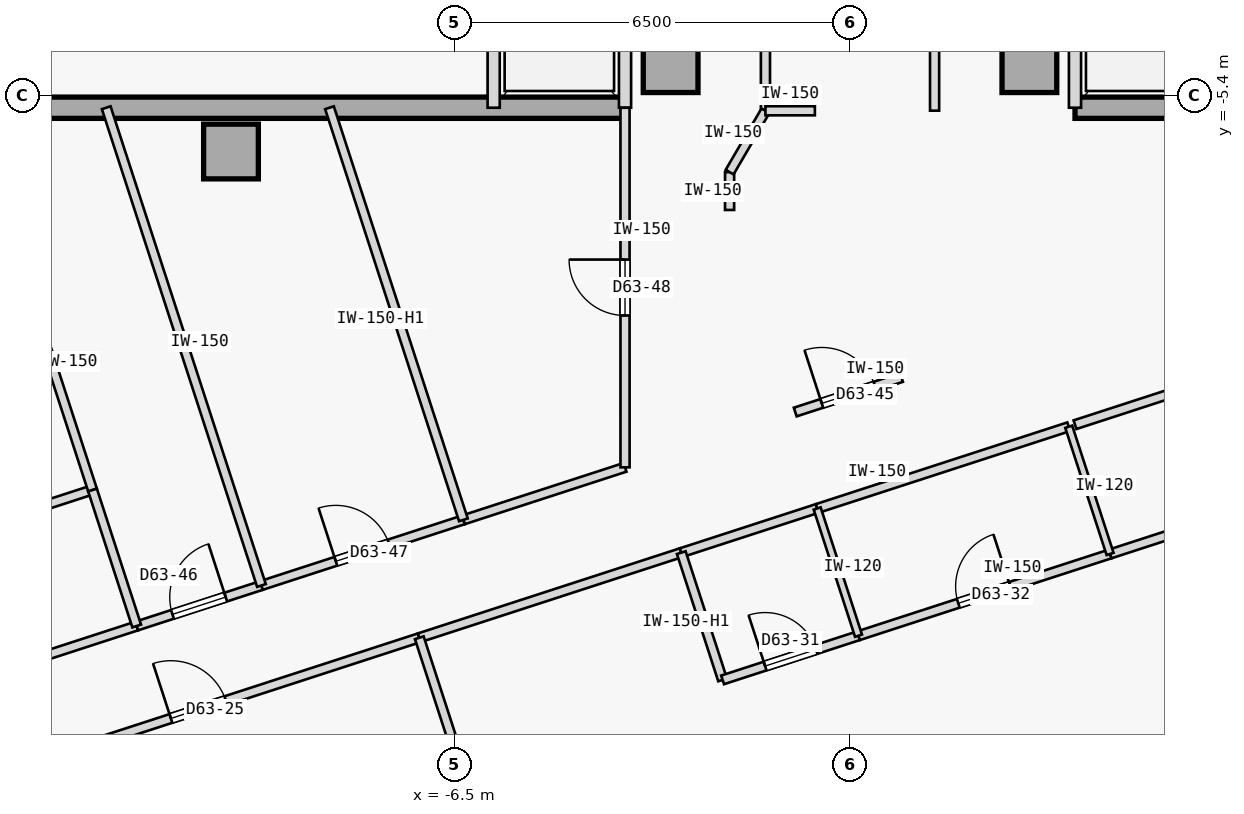
"""IFC4 building model, lengths in metres.
Left out: names, types, materials, properties, quantities, classifications, styles, units other than length and angle.
Written with IfcOpenShell. Run it as: python <this file> out.ifc"""

import sys

from ifc_helpers import new_model, si_unit, direction, frame, frame_2d, origin, origin_2d, place, context, subcontext, project, spatial, rectangle, extrude, element, fill, save


model = new_model("IFC4")
c1 = context("Model", 3, precision=1e-05, world=origin(), true_north=direction((0.0, 1.0)))
c2 = subcontext(c1, "Body", "Model", "MODEL_VIEW")
j1 = project(units=[si_unit("LENGTHUNIT", "METRE"), si_unit("PLANEANGLEUNIT", "RADIAN")], contexts=[c1])
p1 = place(None, origin())
s1 = spatial("IfcSite", under=j1, at=p1, CompositionType="ELEMENT")
p2 = place(p1, origin())
s2 = spatial("IfcBuilding", under=s1, at=p2, CompositionType="ELEMENT")
p3 = place(p2, frame((0.0, 0.0, 237.7)))
s3 = spatial("IfcBuildingStorey", under=s2, at=p3, CompositionType="ELEMENT", Elevation=237.7)
for number, where, z_axis, x_axis in (
    (1, (-10.18, -6.32, 0.0), (0.0, 0.0, 1.0), (1.0, 0.0, 0.0)),
    (2, (-2.95, -4.9, 0.0), (0.0, 0.0, 1.0), (1.0, 0.0, 0.0)),
    (3, (2.95, -4.9, 0.0), (0.0, 0.0, 1.0), (1.0, 0.0, 0.0)),
):
    element("IfcColumn", number, at=place(p3, frame(where, z_axis=z_axis, x_axis=x_axis)), inside=s3, PredefinedType="COLUMN", context=c2, shape_type="SweptSolid", body=[
        extrude(rectangle(XDim=0.9, YDim=0.9, at=origin_2d()), origin(), (0.0, 0.0, 1.0), 3.35),
    ])
for number, where, z_axis, x_axis in (
    (4, (-14.56, -5.6, 0.0), (0.0, 0.0, 1.0), (1.0, 0.0, 0.0)),
    (5, (3.7, -5.6, 0.0), (0.0, 0.0, 1.0), (1.0, 0.0, 0.0)),
):
    element("IfcWall", number, at=place(p3, frame(where, z_axis=z_axis, x_axis=x_axis)), inside=s3, PredefinedType="SHEAR", context=c2, shape_type="SweptSolid", body=[
        extrude(rectangle(XDim=10.86, YDim=0.35, at=frame_2d((5.43, 0.0))), origin(), (0.0, 0.0, 1.0), 3.125),
    ])
for number, where, z_axis, x_axis in (
    (6, (-3.7, -5.6, 0.0), (0.0, 0.0, 1.0), (0.0, 1.0, 0.0)),
    (7, (-5.86, -5.6, 0.0), (0.0, 0.0, 1.0), (0.0, 1.0, 0.0)),
    (8, (3.7, -5.6, 0.0), (0.0, 0.0, 1.0), (0.0, 1.0, 0.0)),
):
    element("IfcWall", number, at=place(p3, frame(where, z_axis=z_axis, x_axis=x_axis)), inside=s3, PredefinedType="STANDARD", context=c2, shape_type="SweptSolid", body=[
        extrude(rectangle(XDim=2.65, YDim=0.2, at=frame_2d((1.325, 0.0))), origin(), (0.0, 0.0, 1.0), 3.125),
    ])
p4 = place(p3, frame((-1.391, -5.65, 0.0), z_axis=(0.0, 0.0, 1.0), x_axis=(-8.6422954e-05, 0.999999996266, 0.0)))
e9 = element("IfcWall", 9, at=p4, inside=s3, PredefinedType="PARTITIONING", context=c2, shape_type="SweptSolid", body=[
    extrude(rectangle(XDim=11.3, YDim=0.15, at=frame_2d((5.65, 0.0))), origin(), (0.0, 0.0, 1.0), 3.125),
])
p5 = place(p4, frame((5.175, 0.0, 0.0)))
e10 = element("IfcOpeningElement", 10, at=p5, cuts=e9, PredefinedType="OPENING", context=c2, shape_type="SweptSolid", body=[
    extrude(rectangle(XDim=0.95, YDim=2.15, at=frame_2d((0.475, 1.075))), frame((0.0, 0.085, 0.0), z_axis=(0.0, -1.0, 0.0), x_axis=(1.0, 0.0, 0.0)), (0.0, 0.0, 1.0), 0.17),
])
p6 = place(p3, frame((1.391, -5.648, 0.0), z_axis=(0.0, 0.0, 1.0), x_axis=(-4.3218947e-05, 0.999999999066, 0.0)))
e11 = element("IfcWall", 11, at=p6, inside=s3, PredefinedType="PARTITIONING", context=c2, shape_type="SweptSolid", body=[
    extrude(rectangle(XDim=11.298, YDim=0.15, at=frame_2d((5.649, 0.0))), origin(), (0.0, 0.0, 1.0), 3.125),
])
p7 = place(p3, frame((-14.349, -16.677, 0.0), z_axis=(0.0, 0.0, 1.0), x_axis=(0.951058958043, 0.309009479345, 0.0)))
e12 = element("IfcWall", 12, at=p7, inside=s3, PredefinedType="PARTITIONING", context=c2, shape_type="SweptSolid", body=[
    extrude(rectangle(XDim=7.64, YDim=0.15, at=frame_2d((3.82, 0.0))), origin(), (0.0, 0.0, 1.0), 3.125),
])
p8 = place(p7, frame((3.345, 0.0, 0.0)))
e13 = element("IfcOpeningElement", 13, at=p8, cuts=e12, PredefinedType="OPENING", context=c2, shape_type="SweptSolid", body=[
    extrude(rectangle(XDim=0.95, YDim=2.15, at=frame_2d((0.475, 1.075))), frame((0.0, 0.085, 0.0), z_axis=(0.0, -1.0, 0.0), x_axis=(1.0, 0.0, 0.0)), (0.0, 0.0, 1.0), 0.17),
])
p9 = place(p3, frame((-7.083, -14.316, 0.0), z_axis=(0.0, 0.0, 1.0), x_axis=(0.951054265246, 0.309023922305, 0.0)))
e14 = element("IfcWall", 14, at=p9, inside=s3, PredefinedType="PARTITIONING", context=c2, shape_type="SweptSolid", body=[
    extrude(rectangle(XDim=4.53, YDim=0.15, at=frame_2d((2.265, 0.0))), origin(), (0.0, 0.0, 1.0), 3.125),
])
p10 = place(p3, frame((-2.775, -12.917, 0.0), z_axis=(0.0, 0.0, 1.0), x_axis=(0.951066131077, 0.308987401554, 0.0)))
e15 = element("IfcWall", 15, at=p10, inside=s3, PredefinedType="PARTITIONING", context=c2, shape_type="SweptSolid", body=[
    extrude(rectangle(XDim=2.35, YDim=0.15, at=frame_2d((1.175, 0.0))), origin(), (0.0, 0.0, 1.0), 3.125),
])
p11 = place(p3, frame((-0.54, -12.19, 0.0), z_axis=(0.0, 0.0, 1.0), x_axis=(0.951057987102, 0.309012467661, 0.0)))
e16 = element("IfcWall", 16, at=p11, inside=s3, PredefinedType="PARTITIONING", context=c2, shape_type="SweptSolid", body=[
    extrude(rectangle(XDim=4.35, YDim=0.15, at=frame_2d((2.175, 0.0))), origin(), (0.0, 0.0, 1.0), 3.125),
])
p12 = place(p3, frame((3.7, -10.813, 0.0), z_axis=(0.0, 0.0, 1.0), x_axis=(0.95106685659, 0.308985168408, 0.0)))
e17 = element("IfcWall", 17, at=p12, inside=s3, PredefinedType="PARTITIONING", context=c2, shape_type="SweptSolid", body=[
    extrude(rectangle(XDim=3.392, YDim=0.15, at=frame_2d((1.696, 0.0))), origin(), (0.0, 0.0, 1.0), 3.125),
])
p13 = place(p3, frame((-29.45, -19.881, 0.0), z_axis=(0.0, 0.0, 1.0), x_axis=(0.95105650271, 0.309017036186, 0.0)))
e18 = element("IfcWall", 18, at=p13, inside=s3, PredefinedType="PARTITIONING", context=c2, shape_type="SweptSolid", body=[
    extrude(rectangle(XDim=18.632, YDim=0.15, at=frame_2d((9.316, 0.0))), origin(), (0.0, 0.0, 1.0), 3.125),
])
p14 = place(p13, frame((8.856, 0.0, 0.0)))
e19 = element("IfcOpeningElement", 19, at=p14, cuts=e18, PredefinedType="OPENING", context=c2, shape_type="SweptSolid", body=[
    extrude(rectangle(XDim=0.92, YDim=2.15, at=frame_2d((0.46, 1.075))), frame((0.0, 0.085, 0.0), z_axis=(0.0, -1.0, 0.0), x_axis=(1.0, 0.0, 0.0)), (0.0, 0.0, 1.0), 0.17),
])
p15 = place(p3, frame((-0.901, -10.604, 0.0), z_axis=(0.0, 0.0, 1.0), x_axis=(0.951085784807, 0.308926900637, 0.0)))
e20 = element("IfcWall", 20, at=p15, inside=s3, PredefinedType="PARTITIONING", context=c2, shape_type="SweptSolid", body=[
    extrude(rectangle(XDim=1.838, YDim=0.15, at=frame_2d((0.919, 0.0))), origin(), (0.0, 0.0, 1.0), 3.125),
])
p16 = place(p15, frame((0.459, 0.0, 0.0)))
e21 = element("IfcOpeningElement", 21, at=p16, cuts=e20, PredefinedType="OPENING", context=c2, shape_type="SweptSolid", body=[
    extrude(rectangle(XDim=0.92, YDim=2.15, at=frame_2d((0.46, 1.075))), frame((0.0, 0.085, 0.0), z_axis=(0.0, -1.0, 0.0), x_axis=(1.0, 0.0, 0.0)), (0.0, 0.0, 1.0), 0.17),
])
p17 = place(p3, frame((-1.98, -7.281, 0.0), z_axis=(0.0, 0.0, 1.0), x_axis=(0.000784313484, 0.999999692426, 0.0)))
e22 = element("IfcWall", 22, at=p17, inside=s3, PredefinedType="PARTITIONING", context=c2, shape_type="SweptSolid", body=[
    extrude(rectangle(XDim=0.623, YDim=0.15, at=frame_2d((0.311, 0.0))), origin(), (0.0, 0.0, 1.0), 3.125),
])
p18 = place(p3, frame((-1.98, -6.659, 0.0), z_axis=(0.0, 0.0, 1.0), x_axis=(0.504533622976, 0.863392044952, 0.0)))
e23 = element("IfcWall", 23, at=p18, inside=s3, PredefinedType="PARTITIONING", context=c2, shape_type="SweptSolid", body=[
    extrude(rectangle(XDim=1.168, YDim=0.15, at=frame_2d((0.584, 0.0))), origin(), (0.0, 0.0, 1.0), 3.125),
])
p19 = place(p3, frame((-11.73, -14.123, 0.0), z_axis=(0.0, 0.0, 1.0), x_axis=(0.951066501686, 0.308986260812, 0.0)))
e24 = element("IfcWall", 24, at=p19, inside=s3, PredefinedType="PARTITIONING", context=c2, shape_type="SweptSolid", body=[
    extrude(rectangle(XDim=2.157, YDim=0.15, at=frame_2d((1.079, 0.0))), origin(), (0.0, 0.0, 1.0), 3.125),
])
p20 = place(p19, frame((0.618, 0.0, 0.0)))
e25 = element("IfcOpeningElement", 25, at=p20, cuts=e24, PredefinedType="OPENING", context=c2, shape_type="SweptSolid", body=[
    extrude(rectangle(XDim=0.92, YDim=2.15, at=frame_2d((0.46, 1.075))), frame((0.0, 0.085, 0.0), z_axis=(0.0, -1.0, 0.0), x_axis=(1.0, 0.0, 0.0)), (0.0, 0.0, 1.0), 0.17),
])
p21 = place(p3, frame((-9.679, -13.457, 0.0), z_axis=(0.0, 0.0, 1.0), x_axis=(0.951054104561, 0.309024416831, 0.0)))
e26 = element("IfcWall", 26, at=p21, inside=s3, PredefinedType="PARTITIONING", context=c2, shape_type="SweptSolid", body=[
    extrude(rectangle(XDim=3.492, YDim=0.15, at=frame_2d((1.746, 0.0))), origin(), (0.0, 0.0, 1.0), 3.125),
])
p22 = place(p21, frame((1.286, 0.0, 0.0)))
e27 = element("IfcOpeningElement", 27, at=p22, cuts=e26, PredefinedType="OPENING", context=c2, shape_type="SweptSolid", body=[
    extrude(rectangle(XDim=0.92, YDim=2.15, at=frame_2d((0.46, 1.075))), frame((0.0, 0.085, 0.0), z_axis=(0.0, -1.0, 0.0), x_axis=(1.0, 0.0, 0.0)), (0.0, 0.0, 1.0), 0.17),
])
p23 = place(p3, frame((-6.358, -12.377, 0.0), z_axis=(0.0, 0.0, 1.0), x_axis=(0.951049473261, 0.309038669765, 0.0)))
e28 = element("IfcWall", 28, at=p23, inside=s3, PredefinedType="PARTITIONING", context=c2, shape_type="SweptSolid", body=[
    extrude(rectangle(XDim=2.795, YDim=0.15, at=frame_2d((1.397, 0.0))), origin(), (0.0, 0.0, 1.0), 3.125),
])
p24 = place(p3, frame((-3.7, -11.514, 0.0), z_axis=(0.0, 0.0, 1.0), x_axis=(-8.2572974e-05, 0.999999996591, 0.0)))
e29 = element("IfcWall", 29, at=p24, inside=s3, PredefinedType="PARTITIONING", context=c2, shape_type="SweptSolid", body=[
    extrude(rectangle(XDim=5.913, YDim=0.15, at=frame_2d((2.957, 0.0))), origin(), (0.0, 0.0, 1.0), 3.125),
])
p25 = place(p24, frame((2.497, 0.0, 0.0)))
e30 = element("IfcOpeningElement", 30, at=p25, cuts=e29, PredefinedType="OPENING", context=c2, shape_type="SweptSolid", body=[
    extrude(rectangle(XDim=0.92, YDim=2.15, at=frame_2d((0.46, 1.075))), frame((0.0, 0.085, 0.0), z_axis=(0.0, -1.0, 0.0), x_axis=(1.0, 0.0, 0.0)), (0.0, 0.0, 1.0), 0.17),
])
p26 = place(p3, frame((-1.391, -5.65, 0.0), z_axis=(0.0, 0.0, 1.0), x_axis=(0.999999954883, 0.000300390494, 0.0)))
e31 = element("IfcWall", 31, at=p26, inside=s3, PredefinedType="PARTITIONING", context=c2, shape_type="SweptSolid", body=[
    extrude(rectangle(XDim=0.813, YDim=0.15, at=frame_2d((0.406, 0.0))), origin(), (0.0, 0.0, 1.0), 3.125),
])
p27 = place(p3, frame((-4.036, -23.696, 0.0), z_axis=(0.0, 0.0, 1.0), x_axis=(-0.309022258842, 0.95105480575, 0.0)))
e32 = element("IfcWall", 32, at=p27, inside=s3, PredefinedType="PARTITIONING", context=c2, shape_type="SweptSolid", body=[
    extrude(rectangle(XDim=9.862, YDim=0.15, at=frame_2d((4.931, 0.0))), origin(), (0.0, 0.0, 1.0), 2.675),
])
p28 = place(p3, frame((-2.095, -15.009, 0.0), z_axis=(0.0, 0.0, 1.0), x_axis=(-0.308960600764, 0.951074837842, 0.0)))
e33 = element("IfcWall", 33, at=p28, inside=s3, PredefinedType="PARTITIONING", context=c2, shape_type="SweptSolid", body=[
    extrude(rectangle(XDim=2.2, YDim=0.15, at=frame_2d((1.1, 0.0))), origin(), (0.0, 0.0, 1.0), 2.675),
])
p29 = place(p3, frame((-2.095, -15.009, 0.0), z_axis=(0.0, 0.0, 1.0), x_axis=(0.951076048914, 0.308956872689, 0.0)))
e34 = element("IfcWall", 34, at=p29, inside=s3, PredefinedType="PARTITIONING", context=c2, shape_type="SweptSolid", body=[
    extrude(rectangle(XDim=2.35, YDim=0.15, at=frame_2d((1.175, 0.0))), origin(), (0.0, 0.0, 1.0), 3.125),
])
p30 = place(p29, frame((0.735, 0.0, 0.0)))
e35 = element("IfcOpeningElement", 35, at=p30, cuts=e34, PredefinedType="OPENING", context=c2, shape_type="SweptSolid", body=[
    extrude(rectangle(XDim=0.88, YDim=2.15, at=frame_2d((0.44, 1.075))), frame((0.0, 0.085, 0.0), z_axis=(0.0, -1.0, 0.0), x_axis=(1.0, 0.0, 0.0)), (0.0, 0.0, 1.0), 0.17),
])
p31 = place(p3, frame((0.14, -14.283, 0.0), z_axis=(0.0, 0.0, 1.0), x_axis=(0.951057987102, 0.309012467661, 0.0)))
e36 = element("IfcWall", 36, at=p31, inside=s3, PredefinedType="PARTITIONING", context=c2, shape_type="SweptSolid", body=[
    extrude(rectangle(XDim=4.35, YDim=0.15, at=frame_2d((2.175, 0.0))), origin(), (0.0, 0.0, 1.0), 3.125),
])
p32 = place(p31, frame((1.725, 0.0, 0.0)))
e37 = element("IfcOpeningElement", 37, at=p32, cuts=e36, PredefinedType="OPENING", context=c2, shape_type="SweptSolid", body=[
    extrude(rectangle(XDim=0.9, YDim=2.15, at=frame_2d((0.45, 1.075))), frame((0.0, 0.085, 0.0), z_axis=(0.0, -1.0, 0.0), x_axis=(1.0, 0.0, 0.0)), (0.0, 0.0, 1.0), 0.17),
])
p33 = place(p3, frame((4.277, -12.938, 0.0), z_axis=(0.0, 0.0, 1.0), x_axis=(0.951055596592, 0.309019824916, 0.0)))
e38 = element("IfcWall", 38, at=p33, inside=s3, PredefinedType="PARTITIONING", context=c2, shape_type="SweptSolid", body=[
    extrude(rectangle(XDim=3.5, YDim=0.15, at=frame_2d((1.75, 0.0))), origin(), (0.0, 0.0, 1.0), 3.125),
])
p34 = place(p33, frame((1.31, 0.0, 0.0)))
e39 = element("IfcOpeningElement", 39, at=p34, cuts=e38, PredefinedType="OPENING", context=c2, shape_type="SweptSolid", body=[
    extrude(rectangle(XDim=0.88, YDim=2.15, at=frame_2d((0.44, 1.075))), frame((0.0, 0.085, 0.0), z_axis=(0.0, -1.0, 0.0), x_axis=(1.0, 0.0, 0.0)), (0.0, 0.0, 1.0), 0.17),
])
for number, where, z_axis, x_axis in (
    (40, (0.14, -14.283, 0.0), (0.0, 0.0, 1.0), (-0.309, 0.951, 0.0)),
    (41, (4.277, -12.938, 0.0), (0.0, 0.0, 1.0), (-0.309, 0.951, 0.0)),
):
    element("IfcWall", number, at=place(p3, frame(where, z_axis=z_axis, x_axis=x_axis)), inside=s3, PredefinedType="PARTITIONING", context=c2, shape_type="SweptSolid", body=[
        extrude(rectangle(XDim=2.2, YDim=0.12, at=frame_2d((1.1, 0.0))), origin(), (0.0, 0.0, 1.0), 3.125),
    ])
p35 = place(p3, frame((-30.178, -17.642, 0.0), z_axis=(0.0, 0.0, 1.0), x_axis=(0.95105650271, 0.309017036186, 0.0)))
e42 = element("IfcWall", 42, at=p35, inside=s3, PredefinedType="PARTITIONING", context=c2, shape_type="SweptSolid", body=[
    extrude(rectangle(XDim=18.632, YDim=0.15, at=frame_2d((9.316, 0.0))), origin(), (0.0, 0.0, 1.0), 3.125),
])
p36 = place(p35, frame((8.856, 0.0, 0.0)))
e43 = element("IfcOpeningElement", 43, at=p36, cuts=e42, PredefinedType="OPENING", context=c2, shape_type="SweptSolid", body=[
    extrude(rectangle(XDim=0.92, YDim=2.15, at=frame_2d((0.46, 1.075))), frame((0.0, 0.085, 0.0), z_axis=(0.0, -1.0, 0.0), x_axis=(1.0, 0.0, 0.0)), (0.0, 0.0, 1.0), 0.17),
])
p37 = place(p3, frame((-11.73, -14.123, 0.0), z_axis=(0.0, 0.0, 1.0), x_axis=(-0.309062621189, 0.951041690035, 0.0)))
e44 = element("IfcWall", 44, at=p37, inside=s3, PredefinedType="PARTITIONING", context=c2, shape_type="SweptSolid", body=[
    extrude(rectangle(XDim=2.354, YDim=0.15, at=frame_2d((1.177, 0.0))), origin(), (0.0, 0.0, 1.0), 3.125),
])
p38 = place(p3, frame((-12.458, -11.884, 0.0), z_axis=(0.0, 0.0, 1.0), x_axis=(-0.308946982245, 0.951079261766, 0.0)))
e45 = element("IfcWall", 45, at=p38, inside=s3, PredefinedType="PARTITIONING", context=c2, shape_type="SweptSolid", body=[
    extrude(rectangle(XDim=3.334, YDim=0.15, at=frame_2d((1.667, 0.0))), origin(), (0.0, 0.0, 1.0), 3.125),
])
p39 = place(p3, frame((-9.679, -13.457, 0.0), z_axis=(0.0, 0.0, 1.0), x_axis=(-0.309010558951, 0.951058607267, 0.0)))
e46 = element("IfcWall", 46, at=p39, inside=s3, PredefinedType="PARTITIONING", context=c2, shape_type="SweptSolid", body=[
    extrude(rectangle(XDim=8.261, YDim=0.15, at=frame_2d((4.13, 0.0))), origin(), (0.0, 0.0, 1.0), 3.125),
])
p40 = place(p3, frame((-6.358, -12.377, 0.0), z_axis=(0.0, 0.0, 1.0), x_axis=(-0.309024097906, 0.951054208189, 0.0)))
e47 = element("IfcWall", 47, at=p40, inside=s3, PredefinedType="PARTITIONING", context=c2, shape_type="SweptSolid", body=[
    extrude(rectangle(XDim=7.126, YDim=0.15, at=frame_2d((3.563, 0.0))), origin(), (0.0, 0.0, 1.0), 2.675),
])
p41 = place(p8, origin())
e48 = element("IfcDoor", 48, at=p41, inside=s3, OperationType="SINGLE_SWING_LEFT", PredefinedType="DOOR", context=c2, shape_type="SweptSolid", body=[
    extrude(rectangle(XDim=0.95, YDim=2.15, at=frame_2d((0.475, 1.075))), frame((0.0, 0.025, 0.0), z_axis=(0.0, -1.0, 0.0), x_axis=(1.0, 0.0, 0.0)), (0.0, 0.0, 1.0), 0.05),
])
fill(e13, e48)
p42 = place(p30, origin())
e49 = element("IfcDoor", 49, at=p42, inside=s3, OperationType="SINGLE_SWING_LEFT", PredefinedType="DOOR", context=c2, shape_type="SweptSolid", body=[
    extrude(rectangle(XDim=0.88, YDim=2.15, at=frame_2d((0.44, 1.075))), frame((0.0, 0.025, 0.0), z_axis=(0.0, -1.0, 0.0), x_axis=(1.0, 0.0, 0.0)), (0.0, 0.0, 1.0), 0.05),
])
fill(e35, e49)
p43 = place(p32, origin())
e50 = element("IfcDoor", 50, at=p43, inside=s3, OperationType="SINGLE_SWING_RIGHT", PredefinedType="DOOR", context=c2, shape_type="SweptSolid", body=[
    extrude(rectangle(XDim=0.9, YDim=2.15, at=frame_2d((0.45, 1.075))), frame((0.0, 0.025, 0.0), z_axis=(0.0, -1.0, 0.0), x_axis=(1.0, 0.0, 0.0)), (0.0, 0.0, 1.0), 0.05),
])
fill(e37, e50)
p44 = place(p16, origin())
e51 = element("IfcDoor", 51, at=p44, inside=s3, OperationType="SINGLE_SWING_LEFT", PredefinedType="DOOR", context=c2, shape_type="SweptSolid", body=[
    extrude(rectangle(XDim=0.92, YDim=2.15, at=frame_2d((0.46, 1.075))), frame((0.0, 0.025, 0.0), z_axis=(0.0, -1.0, 0.0), x_axis=(1.0, 0.0, 0.0)), (0.0, 0.0, 1.0), 0.05),
])
fill(e21, e51)
p45 = place(p20, origin())
e52 = element("IfcDoor", 52, at=p45, inside=s3, OperationType="SINGLE_SWING_RIGHT", PredefinedType="DOOR", context=c2, shape_type="SweptSolid", body=[
    extrude(rectangle(XDim=0.92, YDim=2.15, at=frame_2d((0.46, 1.075))), frame((0.0, 0.025, 0.0), z_axis=(0.0, -1.0, 0.0), x_axis=(1.0, 0.0, 0.0)), (0.0, 0.0, 1.0), 0.05),
])
fill(e25, e52)
p46 = place(p22, origin())
e53 = element("IfcDoor", 53, at=p46, inside=s3, OperationType="SINGLE_SWING_LEFT", PredefinedType="DOOR", context=c2, shape_type="SweptSolid", body=[
    extrude(rectangle(XDim=0.92, YDim=2.15, at=frame_2d((0.46, 1.075))), frame((0.0, 0.025, 0.0), z_axis=(0.0, -1.0, 0.0), x_axis=(1.0, 0.0, 0.0)), (0.0, 0.0, 1.0), 0.05),
])
fill(e27, e53)
p47 = place(p25, origin())
e54 = element("IfcDoor", 54, at=p47, inside=s3, OperationType="SINGLE_SWING_RIGHT", PredefinedType="DOOR", context=c2, shape_type="SweptSolid", body=[
    extrude(rectangle(XDim=0.92, YDim=2.15, at=frame_2d((0.46, 1.075))), frame((0.0, 0.025, 0.0), z_axis=(0.0, -1.0, 0.0), x_axis=(1.0, 0.0, 0.0)), (0.0, 0.0, 1.0), 0.05),
])
fill(e30, e54)
save(model, sys.argv[1])
